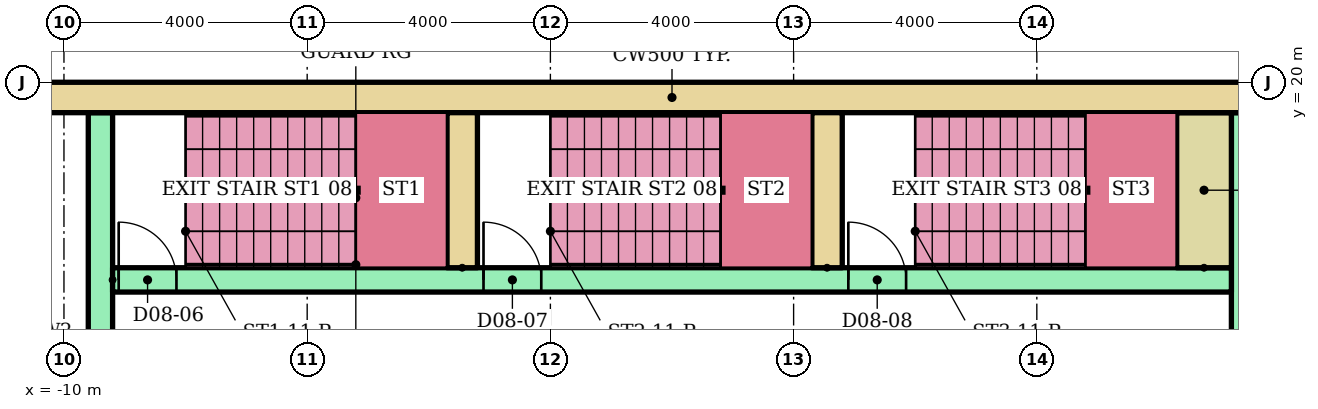
"""IFC4 building model, lengths in metres.
Left out: names, types, materials, properties, quantities, classifications, styles, units other than length and angle.
Written with IfcOpenShell. Run it as: python <this file> out.ifc"""

import sys

from ifc_helpers import new_model, si_unit, direction, frame, frame_2d, origin, place, context, subcontext, project, spatial, rectangle, extrude, element, fill, save


model = new_model("IFC4")
c1 = context("Model", 3, precision=1e-05, world=origin(), true_north=direction((0.0, 1.0)))
c2 = subcontext(c1, "Body", "Model", "MODEL_VIEW")
j1 = project(units=[si_unit("LENGTHUNIT", "METRE"), si_unit("PLANEANGLEUNIT", "RADIAN")], contexts=[c1])
p1 = place(None, origin())
s1 = spatial("IfcSite", under=j1, at=p1, CompositionType="ELEMENT")
p2 = place(p1, origin())
s2 = spatial("IfcBuilding", under=s1, at=p2, CompositionType="ELEMENT")
p3 = place(p2, frame((0.0, 0.0, 33.8)))
s3 = spatial("IfcBuildingStorey", under=s2, at=p3, CompositionType="ELEMENT", Elevation=33.8)
p4 = place(p3, frame((-13.5, 19.75, 0.0)))
e1 = element("IfcWall", 1, at=p4, inside=s3, PredefinedType="SHEAR", context=c2, shape_type="SweptSolid", body=[
    extrude(rectangle(XDim=27.0, YDim=0.5, at=frame_2d((13.5, 0.0))), origin(), (0.0, 0.0, 1.0), 3.6),
])
p5 = place(p3, frame((-9.4, 6.8, 0.0), z_axis=(0.0, 0.0, 1.0), x_axis=(0.0, 1.0, 0.0)))
e2 = element("IfcWall", 2, at=p5, inside=s3, PredefinedType="SHEAR", context=c2, shape_type="SweptSolid", body=[
    extrude(rectangle(XDim=12.7, YDim=0.4, at=frame_2d((6.35, 0.0))), origin(), (0.0, 0.0, 1.0), 3.6),
])
p6 = place(p5, frame((1.15, 0.0, 0.0)))
e3 = element("IfcOpeningElement", 3, at=p6, cuts=e2, PredefinedType="OPENING", context=c2, shape_type="SweptSolid", body=[
    extrude(rectangle(XDim=1.0, YDim=2.1, at=frame_2d((0.5, 1.05))), frame((0.0, 0.21, 0.0), z_axis=(0.0, -1.0, 0.0), x_axis=(1.0, 0.0, 0.0)), (0.0, 0.0, 1.0), 0.42),
])
p7 = place(p5, frame((7.925, 0.0, 0.0)))
e4 = element("IfcOpeningElement", 4, at=p7, cuts=e2, PredefinedType="OPENING", context=c2, shape_type="SweptSolid", body=[
    extrude(rectangle(XDim=1.0, YDim=2.1, at=frame_2d((0.5, 1.05))), frame((0.0, 0.21, 0.0), z_axis=(0.0, -1.0, 0.0), x_axis=(1.0, 0.0, 0.0)), (0.0, 0.0, 1.0), 0.42),
])
p8 = place(p3, frame((9.4, 6.8, 0.0), z_axis=(0.0, 0.0, 1.0), x_axis=(0.0, 1.0, 0.0)))
e5 = element("IfcWall", 5, at=p8, inside=s3, PredefinedType="SHEAR", context=c2, shape_type="SweptSolid", body=[
    extrude(rectangle(XDim=12.7, YDim=0.4, at=frame_2d((6.35, 0.0))), origin(), (0.0, 0.0, 1.0), 3.6),
])
p9 = place(p8, frame((0.3, 0.0, 0.0)))
e6 = element("IfcOpeningElement", 6, at=p9, cuts=e5, PredefinedType="OPENING", context=c2, shape_type="SweptSolid", body=[
    extrude(rectangle(XDim=1.0, YDim=2.1, at=frame_2d((0.5, 1.05))), frame((0.0, 0.21, 0.0), z_axis=(0.0, -1.0, 0.0), x_axis=(1.0, 0.0, 0.0)), (0.0, 0.0, 1.0), 0.42),
])
p10 = place(p8, frame((2.05, 0.0, 0.0)))
e7 = element("IfcOpeningElement", 7, at=p10, cuts=e5, PredefinedType="OPENING", context=c2, shape_type="SweptSolid", body=[
    extrude(rectangle(XDim=1.0, YDim=2.1, at=frame_2d((0.5, 1.05))), frame((0.0, 0.21, 0.0), z_axis=(0.0, -1.0, 0.0), x_axis=(1.0, 0.0, 0.0)), (0.0, 0.0, 1.0), 0.42),
])
p11 = place(p8, frame((7.925, 0.0, 0.0)))
e8 = element("IfcOpeningElement", 8, at=p11, cuts=e5, PredefinedType="OPENING", context=c2, shape_type="SweptSolid", body=[
    extrude(rectangle(XDim=1.0, YDim=2.1, at=frame_2d((0.5, 1.05))), frame((0.0, 0.21, 0.0), z_axis=(0.0, -1.0, 0.0), x_axis=(1.0, 0.0, 0.0)), (0.0, 0.0, 1.0), 0.42),
])
p12 = place(p3, frame((-9.2, 16.75, 0.0)))
e9 = element("IfcWall", 9, at=p12, inside=s3, PredefinedType="SHEAR", context=c2, shape_type="SweptSolid", body=[
    extrude(rectangle(XDim=18.4, YDim=0.4, at=frame_2d((9.2, 0.0))), origin(), (0.0, 0.0, 1.0), 3.6),
])
p13 = place(p12, frame((0.1, 0.0, 0.0)))
e10 = element("IfcOpeningElement", 10, at=p13, cuts=e9, PredefinedType="OPENING", context=c2, shape_type="SweptSolid", body=[
    extrude(rectangle(XDim=0.95, YDim=2.1, at=frame_2d((0.475, 1.05))), frame((0.0, 0.21, 0.0), z_axis=(0.0, -1.0, 0.0), x_axis=(1.0, 0.0, 0.0)), (0.0, 0.0, 1.0), 0.42),
])
p14 = place(p12, frame((6.1, 0.0, 0.0)))
e11 = element("IfcOpeningElement", 11, at=p14, cuts=e9, PredefinedType="OPENING", context=c2, shape_type="SweptSolid", body=[
    extrude(rectangle(XDim=0.95, YDim=2.1, at=frame_2d((0.475, 1.05))), frame((0.0, 0.21, 0.0), z_axis=(0.0, -1.0, 0.0), x_axis=(1.0, 0.0, 0.0)), (0.0, 0.0, 1.0), 0.42),
])
p15 = place(p12, frame((12.1, 0.0, 0.0)))
e12 = element("IfcOpeningElement", 12, at=p15, cuts=e9, PredefinedType="OPENING", context=c2, shape_type="SweptSolid", body=[
    extrude(rectangle(XDim=0.95, YDim=2.1, at=frame_2d((0.475, 1.05))), frame((0.0, 0.21, 0.0), z_axis=(0.0, -1.0, 0.0), x_axis=(1.0, 0.0, 0.0)), (0.0, 0.0, 1.0), 0.42),
])
for number, where, z_axis, x_axis in (
    (13, (-3.45, 16.95, 0.0), (0.0, 0.0, 1.0), (0.0, 1.0, 0.0)),
    (14, (2.55, 16.95, 0.0), (0.0, 0.0, 1.0), (0.0, 1.0, 0.0)),
):
    element("IfcWall", number, at=place(p3, frame(where, z_axis=z_axis, x_axis=x_axis)), inside=s3, PredefinedType="SHEAR", context=c2, shape_type="SweptSolid", body=[
        extrude(rectangle(XDim=2.55, YDim=0.5, at=frame_2d((1.275, 0.0))), origin(), (0.0, 0.0, 1.0), 3.6),
    ])
p16 = place(p3, frame((8.75, 16.95, 0.0), z_axis=(0.0, 0.0, 1.0), x_axis=(0.0, 1.0, 0.0)))
e15 = element("IfcWall", 15, at=p16, inside=s3, PredefinedType="SHEAR", context=c2, shape_type="SweptSolid", body=[
    extrude(rectangle(XDim=2.55, YDim=0.9, at=frame_2d((1.275, 0.0))), origin(), (0.0, 0.0, 1.0), 3.6),
])
p17 = place(p13, origin())
e16 = element("IfcDoor", 16, at=p17, inside=s3, OperationType="SINGLE_SWING_LEFT", PredefinedType="DOOR", context=c2, shape_type="SweptSolid", body=[
    extrude(rectangle(XDim=0.95, YDim=2.1, at=frame_2d((0.475, 1.05))), frame((0.0, 0.025, 0.0), z_axis=(0.0, -1.0, 0.0), x_axis=(1.0, 0.0, 0.0)), (0.0, 0.0, 1.0), 0.05),
])
fill(e10, e16)
p18 = place(p14, origin())
e17 = element("IfcDoor", 17, at=p18, inside=s3, OperationType="SINGLE_SWING_LEFT", PredefinedType="DOOR", context=c2, shape_type="SweptSolid", body=[
    extrude(rectangle(XDim=0.95, YDim=2.1, at=frame_2d((0.475, 1.05))), frame((0.0, 0.025, 0.0), z_axis=(0.0, -1.0, 0.0), x_axis=(1.0, 0.0, 0.0)), (0.0, 0.0, 1.0), 0.05),
])
fill(e11, e17)
p19 = place(p15, origin())
e18 = element("IfcDoor", 18, at=p19, inside=s3, OperationType="SINGLE_SWING_LEFT", PredefinedType="DOOR", context=c2, shape_type="SweptSolid", body=[
    extrude(rectangle(XDim=0.95, YDim=2.1, at=frame_2d((0.475, 1.05))), frame((0.0, 0.025, 0.0), z_axis=(0.0, -1.0, 0.0), x_axis=(1.0, 0.0, 0.0)), (0.0, 0.0, 1.0), 0.05),
])
fill(e12, e18)
save(model, sys.argv[1])
